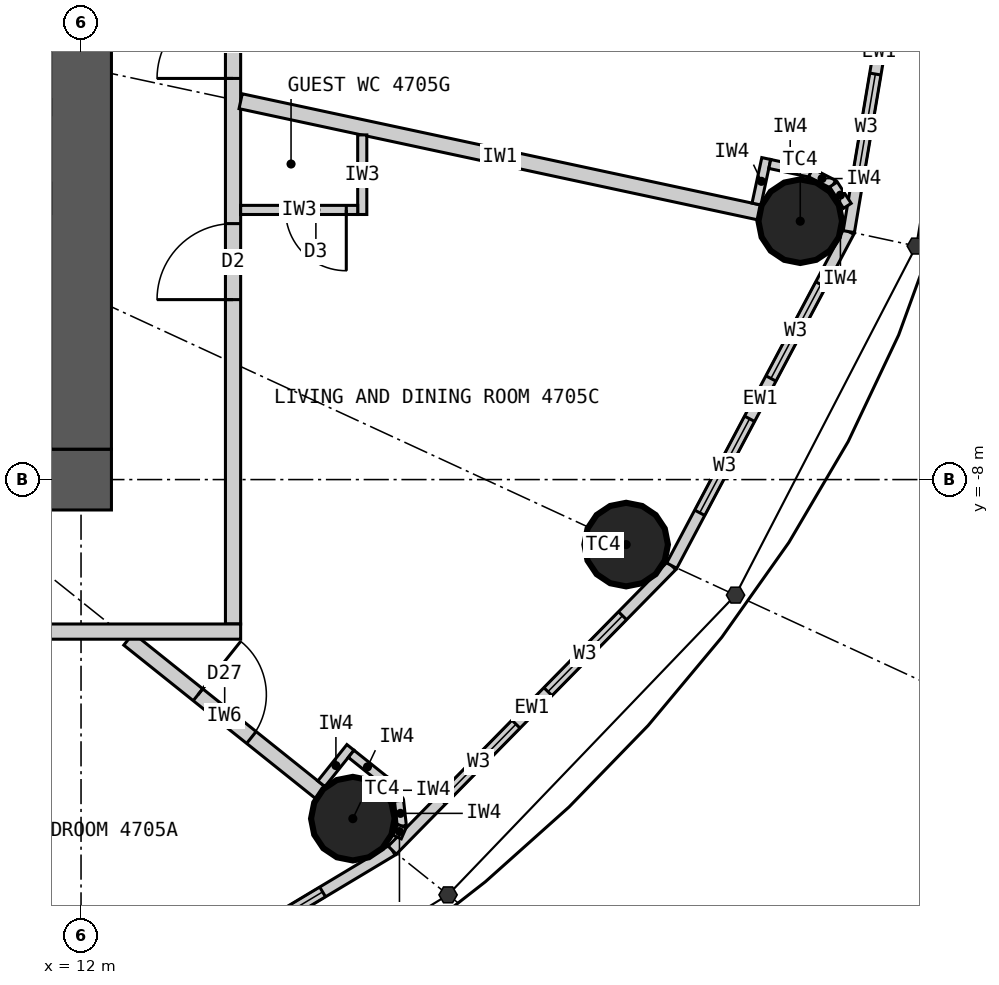
"""IFC4 building model, lengths in metres.
Left out: names, types, materials, properties, quantities, classifications, styles, units other than length and angle.
Written with IfcOpenShell. Run it as: python <this file> out.ifc"""

import sys

from ifc_helpers import new_model, si_unit, direction, frame, frame_2d, origin, origin_2d, place, context, subcontext, project, spatial, rectangle, circle, extrude, element, fill, save


model = new_model("IFC4")
c1 = context("Model", 3, precision=1e-05, world=origin(), true_north=direction((0.0, 1.0)))
c2 = subcontext(c1, "Body", "Model", "MODEL_VIEW")
j1 = project(units=[si_unit("LENGTHUNIT", "METRE"), si_unit("PLANEANGLEUNIT", "RADIAN")], contexts=[c1])
p1 = place(None, origin())
s1 = spatial("IfcSite", under=j1, at=p1, CompositionType="ELEMENT")
p2 = place(p1, origin())
s2 = spatial("IfcBuilding", under=s1, at=p2, CompositionType="ELEMENT")
p3 = place(p2, frame((0.0, 0.0, 176.4)))
s3 = spatial("IfcBuildingStorey", under=s2, at=p3, CompositionType="ELEMENT", Elevation=176.4)
for number, where, z_axis, x_axis in (
    (1, (15.576, -12.461, 0.0), (0.0, 0.0, 1.0), (1.0, 0.0, 0.0)),
    (2, (19.172, -8.855, 0.0), (0.0, 0.0, 1.0), (1.0, 0.0, 0.0)),
    (3, (21.463, -4.601, 0.0), (0.0, 0.0, 1.0), (1.0, 0.0, 0.0)),
):
    element("IfcColumn", number, at=place(p3, frame(where, z_axis=z_axis, x_axis=x_axis)), inside=s3, PredefinedType="COLUMN", context=c2, shape_type="SweptSolid", body=[
        extrude(circle(Radius=0.55, at=origin_2d()), origin(), (0.0, 0.0, 1.0), 3.3),
    ])
p4 = place(p3, frame((12.4, -8.0, 0.0), z_axis=(0.0, 0.0, 1.0), x_axis=(-1.0, 0.0, 0.0)))
e4 = element("IfcWall", 4, at=p4, inside=s3, PredefinedType="SHEAR", context=c2, shape_type="SweptSolid", body=[
    extrude(rectangle(XDim=24.8, YDim=0.8, at=frame_2d((12.4, 0.0))), origin(), (0.0, 0.0, 1.0), 3.3),
])
p5 = place(p4, frame((11.1, 0.0, 0.0)))
e5 = element("IfcOpeningElement", 5, at=p5, cuts=e4, PredefinedType="OPENING", context=c2, shape_type="SweptSolid", body=[
    extrude(rectangle(XDim=1.2, YDim=2.2, at=frame_2d((0.6, 1.1))), frame((0.0, 0.41, 0.0), z_axis=(0.0, -1.0, 0.0), x_axis=(1.0, 0.0, 0.0)), (0.0, 0.0, 1.0), 0.82),
])
p6 = place(p4, frame((18.7, 0.0, 0.0)))
e6 = element("IfcOpeningElement", 6, at=p6, cuts=e4, PredefinedType="OPENING", context=c2, shape_type="SweptSolid", body=[
    extrude(rectangle(XDim=0.9, YDim=2.2, at=frame_2d((0.45, 1.1))), frame((0.0, 0.41, 0.0), z_axis=(0.0, -1.0, 0.0), x_axis=(1.0, 0.0, 0.0)), (0.0, 0.0, 1.0), 0.82),
])
p7 = place(p3, frame((12.0, -7.6, 0.0), z_axis=(0.0, 0.0, 1.0), x_axis=(0.0, 1.0, 0.0)))
e7 = element("IfcWall", 7, at=p7, inside=s3, PredefinedType="SHEAR", context=c2, shape_type="SweptSolid", body=[
    extrude(rectangle(XDim=15.2, YDim=0.8, at=frame_2d((7.6, 0.0))), origin(), (0.0, 0.0, 1.0), 3.3),
])
p8 = place(p7, frame((6.7, 0.0, 0.0)))
e8 = element("IfcOpeningElement", 8, at=p8, cuts=e7, PredefinedType="OPENING", context=c2, shape_type="SweptSolid", body=[
    extrude(rectangle(XDim=1.8, YDim=2.2, at=frame_2d((0.9, 1.1))), frame((0.0, 0.41, 0.0), z_axis=(0.0, -1.0, 0.0), x_axis=(1.0, 0.0, 0.0)), (0.0, 0.0, 1.0), 0.82),
])
p9 = place(p3, frame((11.346, -15.722, 0.0), z_axis=(0.0, 0.0, 1.0), x_axis=(0.857695199231, 0.514158482587, 0.0)))
e9 = element("IfcWall", 9, at=p9, inside=s3, PredefinedType="ELEMENTEDWALL", context=c2, shape_type="SweptSolid", body=[
    extrude(rectangle(XDim=5.536, YDim=0.15, at=frame_2d((2.768, 0.0))), origin(), (0.0, 0.0, 1.0), 3.12),
])
p10 = place(p9, frame((1.068, 0.0, 0.9)))
e10 = element("IfcOpeningElement", 10, at=p10, cuts=e9, PredefinedType="OPENING", context=c2, shape_type="SweptSolid", body=[
    extrude(rectangle(XDim=1.4, YDim=1.9, at=frame_2d((0.7, 0.95))), frame((0.0, 0.085, 0.0), z_axis=(0.0, -1.0, 0.0), x_axis=(1.0, 0.0, 0.0)), (0.0, 0.0, 1.0), 0.17),
])
p11 = place(p9, frame((3.068, 0.0, 0.9)))
e11 = element("IfcOpeningElement", 11, at=p11, cuts=e9, PredefinedType="OPENING", context=c2, shape_type="SweptSolid", body=[
    extrude(rectangle(XDim=1.4, YDim=1.9, at=frame_2d((0.7, 0.95))), frame((0.0, 0.085, 0.0), z_axis=(0.0, -1.0, 0.0), x_axis=(1.0, 0.0, 0.0)), (0.0, 0.0, 1.0), 0.17),
])
p12 = place(p3, frame((16.095, -12.876, 0.0), z_axis=(0.0, 0.0, 1.0), x_axis=(0.700727467776, 0.71342905457, 0.0)))
e12 = element("IfcWall", 12, at=p12, inside=s3, PredefinedType="ELEMENTEDWALL", context=c2, shape_type="SweptSolid", body=[
    extrude(rectangle(XDim=5.247, YDim=0.15, at=frame_2d((2.624, 0.0))), origin(), (0.0, 0.0, 1.0), 3.12),
])
p13 = place(p12, frame((0.924, 0.0, 0.9)))
e13 = element("IfcOpeningElement", 13, at=p13, cuts=e12, PredefinedType="OPENING", context=c2, shape_type="SweptSolid", body=[
    extrude(rectangle(XDim=1.4, YDim=1.9, at=frame_2d((0.7, 0.95))), frame((0.0, 0.085, 0.0), z_axis=(0.0, -1.0, 0.0), x_axis=(1.0, 0.0, 0.0)), (0.0, 0.0, 1.0), 0.17),
])
p14 = place(p12, frame((2.924, 0.0, 0.9)))
e14 = element("IfcOpeningElement", 14, at=p14, cuts=e12, PredefinedType="OPENING", context=c2, shape_type="SweptSolid", body=[
    extrude(rectangle(XDim=1.4, YDim=1.9, at=frame_2d((0.7, 0.95))), frame((0.0, 0.085, 0.0), z_axis=(0.0, -1.0, 0.0), x_axis=(1.0, 0.0, 0.0)), (0.0, 0.0, 1.0), 0.17),
])
p15 = place(p3, frame((19.772, -9.132, 0.0), z_axis=(0.0, 0.0, 1.0), x_axis=(0.468428906714, 0.883501193748, 0.0)))
e15 = element("IfcWall", 15, at=p15, inside=s3, PredefinedType="ELEMENTEDWALL", context=c2, shape_type="SweptSolid", body=[
    extrude(rectangle(XDim=4.974, YDim=0.15, at=frame_2d((2.487, 0.0))), origin(), (0.0, 0.0, 1.0), 3.12),
])
p16 = place(p15, frame((0.787, 0.0, 0.9)))
e16 = element("IfcOpeningElement", 16, at=p16, cuts=e15, PredefinedType="OPENING", context=c2, shape_type="SweptSolid", body=[
    extrude(rectangle(XDim=1.4, YDim=1.9, at=frame_2d((0.7, 0.95))), frame((0.0, 0.085, 0.0), z_axis=(0.0, -1.0, 0.0), x_axis=(1.0, 0.0, 0.0)), (0.0, 0.0, 1.0), 0.17),
])
p17 = place(p15, frame((2.787, 0.0, 0.9)))
e17 = element("IfcOpeningElement", 17, at=p17, cuts=e15, PredefinedType="OPENING", context=c2, shape_type="SweptSolid", body=[
    extrude(rectangle(XDim=1.4, YDim=1.9, at=frame_2d((0.7, 0.95))), frame((0.0, 0.085, 0.0), z_axis=(0.0, -1.0, 0.0), x_axis=(1.0, 0.0, 0.0)), (0.0, 0.0, 1.0), 0.17),
])
p18 = place(p3, frame((22.102, -4.738, 0.0), z_axis=(0.0, 0.0, 1.0), x_axis=(0.166162111254, 0.986098449843, 0.0)))
e18 = element("IfcWall", 18, at=p18, inside=s3, PredefinedType="ELEMENTEDWALL", context=c2, shape_type="SweptSolid", body=[
    extrude(rectangle(XDim=4.805, YDim=0.15, at=frame_2d((2.402, 0.0))), origin(), (0.0, 0.0, 1.0), 3.12),
])
p19 = place(p18, frame((0.702, 0.0, 0.9)))
e19 = element("IfcOpeningElement", 19, at=p19, cuts=e18, PredefinedType="OPENING", context=c2, shape_type="SweptSolid", body=[
    extrude(rectangle(XDim=1.4, YDim=1.9, at=frame_2d((0.7, 0.95))), frame((0.0, 0.085, 0.0), z_axis=(0.0, -1.0, 0.0), x_axis=(1.0, 0.0, 0.0)), (0.0, 0.0, 1.0), 0.17),
])
p20 = place(p18, frame((2.702, 0.0, 0.9)))
e20 = element("IfcOpeningElement", 20, at=p20, cuts=e18, PredefinedType="OPENING", context=c2, shape_type="SweptSolid", body=[
    extrude(rectangle(XDim=1.4, YDim=1.9, at=frame_2d((0.7, 0.95))), frame((0.0, 0.085, 0.0), z_axis=(0.0, -1.0, 0.0), x_axis=(1.0, 0.0, 0.0)), (0.0, 0.0, 1.0), 0.17),
])
p21 = place(p3, frame((14.0, -9.9, 0.0), z_axis=(0.0, 0.0, 1.0), x_axis=(0.0, 1.0, 0.0)))
e21 = element("IfcWall", 21, at=p21, inside=s3, PredefinedType="PARTITIONING", context=c2, shape_type="SweptSolid", body=[
    extrude(rectangle(XDim=19.8, YDim=0.2, at=frame_2d((9.9, 0.0))), origin(), (0.0, 0.0, 1.0), 3.12),
])
p22 = place(p21, frame((4.268, 0.0, 0.0)))
e22 = element("IfcOpeningElement", 22, at=p22, cuts=e21, PredefinedType="OPENING", context=c2, shape_type="SweptSolid", body=[
    extrude(rectangle(XDim=1.0, YDim=2.2, at=frame_2d((0.5, 1.1))), frame((0.0, 0.11, 0.0), z_axis=(0.0, -1.0, 0.0), x_axis=(1.0, 0.0, 0.0)), (0.0, 0.0, 1.0), 0.22),
])
p23 = place(p21, frame((7.177, 0.0, 0.0)))
e23 = element("IfcOpeningElement", 23, at=p23, cuts=e21, PredefinedType="OPENING", context=c2, shape_type="SweptSolid", body=[
    extrude(rectangle(XDim=1.0, YDim=2.2, at=frame_2d((0.5, 1.1))), frame((0.0, 0.11, 0.0), z_axis=(0.0, -1.0, 0.0), x_axis=(1.0, 0.0, 0.0)), (0.0, 0.0, 1.0), 0.22),
])
p24 = place(p21, frame((17.701, 0.0, 0.0)))
e24 = element("IfcOpeningElement", 24, at=p24, cuts=e21, PredefinedType="OPENING", context=c2, shape_type="SweptSolid", body=[
    extrude(rectangle(XDim=1.0, YDim=2.2, at=frame_2d((0.5, 1.1))), frame((0.0, 0.11, 0.0), z_axis=(0.0, -1.0, 0.0), x_axis=(1.0, 0.0, 0.0)), (0.0, 0.0, 1.0), 0.22),
])
p25 = place(p3, frame((12.625, -10.1, 0.0), z_axis=(0.0, 0.0, 1.0), x_axis=(0.780876185034, -0.624685827954, 0.0)))
e25 = element("IfcWall", 25, at=p25, inside=s3, PredefinedType="PARTITIONING", context=c2, shape_type="SweptSolid", body=[
    extrude(rectangle(XDim=3.229, YDim=0.2, at=frame_2d((1.615, 0.0))), origin(), (0.0, 0.0, 1.0), 2.42),
])
p26 = place(p25, frame((1.17, 0.0, 0.0)))
e26 = element("IfcOpeningElement", 26, at=p26, cuts=e25, PredefinedType="OPENING", context=c2, shape_type="SweptSolid", body=[
    extrude(rectangle(XDim=0.9, YDim=2.1, at=frame_2d((0.45, 1.05))), frame((0.0, 0.11, 0.0), z_axis=(0.0, -1.0, 0.0), x_axis=(1.0, 0.0, 0.0)), (0.0, 0.0, 1.0), 0.22),
])
p27 = place(p3, frame((14.1, -3.022, 0.0), z_axis=(0.0, 0.0, 1.0), x_axis=(0.977790639684, -0.209584028367, 0.0)))
e27 = element("IfcWall", 27, at=p27, inside=s3, PredefinedType="PARTITIONING", context=c2, shape_type="SweptSolid", body=[
    extrude(rectangle(XDim=6.98, YDim=0.2, at=frame_2d((3.49, 0.0))), origin(), (0.0, 0.0, 1.0), 2.42),
])
p28 = place(p3, frame((15.7, -3.465, 0.0), z_axis=(0.0, 0.0, 1.0), x_axis=(0.0, -1.0, 0.0)))
e28 = element("IfcWall", 28, at=p28, inside=s3, PredefinedType="PARTITIONING", context=c2, shape_type="SweptSolid", body=[
    extrude(rectangle(XDim=1.047, YDim=0.12, at=frame_2d((0.523, 0.0))), origin(), (0.0, 0.0, 1.0), 3.12),
])
p29 = place(p3, frame((14.1, -4.452, 0.0), z_axis=(0.0, 0.0, 1.0), x_axis=(1.0, 0.0, 0.0)))
e29 = element("IfcWall", 29, at=p29, inside=s3, PredefinedType="PARTITIONING", context=c2, shape_type="SweptSolid", body=[
    extrude(rectangle(XDim=1.54, YDim=0.12, at=frame_2d((0.77, 0.0))), origin(), (0.0, 0.0, 1.0), 3.12),
])
p30 = place(p29, frame((0.59, 0.0, 0.0)))
e30 = element("IfcOpeningElement", 30, at=p30, cuts=e29, PredefinedType="OPENING", context=c2, shape_type="SweptSolid", body=[
    extrude(rectangle(XDim=0.8, YDim=2.1, at=frame_2d((0.4, 1.05))), frame((0.0, 0.07, 0.0), z_axis=(0.0, -1.0, 0.0), x_axis=(1.0, 0.0, 0.0)), (0.0, 0.0, 1.0), 0.14),
])
p31 = place(p3, frame((14.1, -10.0, 0.0), z_axis=(0.0, 0.0, 1.0), x_axis=(-1.0, 0.0, 0.0)))
e31 = element("IfcWall", 31, at=p31, inside=s3, PredefinedType="PARTITIONING", context=c2, shape_type="SweptSolid", body=[
    extrude(rectangle(XDim=10.582, YDim=0.2, at=frame_2d((5.291, 0.0))), origin(), (0.0, 0.0, 1.0), 3.12),
])
p32 = place(p3, frame((15.162, -12.002, 0.0), z_axis=(0.0, 0.0, 1.0), x_axis=(0.624597762427, 0.780946627607, 0.0)))
e32 = element("IfcWall", 32, at=p32, inside=s3, PredefinedType="PARTITIONING", context=c2, shape_type="SweptSolid", body=[
    extrude(rectangle(XDim=0.612, YDim=0.12, at=frame_2d((0.306, 0.0))), origin(), (0.0, 0.0, 1.0), 3.12),
])
p33 = place(p3, frame((15.554, -11.608, 0.0), z_axis=(0.0, 0.0, 1.0), x_axis=(0.780695577787, -0.624911525597, 0.0)))
e33 = element("IfcWall", 33, at=p33, inside=s3, PredefinedType="PARTITIONING", context=c2, shape_type="SweptSolid", body=[
    extrude(rectangle(XDim=0.55, YDim=0.12, at=frame_2d((0.275, 0.0))), origin(), (0.0, 0.0, 1.0), 3.12),
])
p34 = place(p3, frame((15.984, -11.952, 0.0), z_axis=(0.0, 0.0, 1.0), x_axis=(0.592335221171, -0.805691619517, 0.0)))
e34 = element("IfcWall", 34, at=p34, inside=s3, PredefinedType="PARTITIONING", context=c2, shape_type="SweptSolid", body=[
    extrude(rectangle(XDim=0.338, YDim=0.12, at=frame_2d((0.169, 0.0))), origin(), (0.0, 0.0, 1.0), 3.12),
])
p35 = place(p3, frame((16.184, -12.224, 0.0), z_axis=(0.0, 0.0, 1.0), x_axis=(0.110669692975, -0.993857242795, 0.0)))
e35 = element("IfcWall", 35, at=p35, inside=s3, PredefinedType="PARTITIONING", context=c2, shape_type="SweptSolid", body=[
    extrude(rectangle(XDim=0.337, YDim=0.12, at=frame_2d((0.169, 0.0))), origin(), (0.0, 0.0, 1.0), 3.12),
])
p36 = place(p3, frame((16.221, -12.559, 0.0), z_axis=(0.0, 0.0, 1.0), x_axis=(-0.401064416249, -0.916049853457, 0.0)))
e36 = element("IfcWall", 36, at=p36, inside=s3, PredefinedType="PARTITIONING", context=c2, shape_type="SweptSolid", body=[
    extrude(rectangle(XDim=0.156, YDim=0.12, at=frame_2d((0.078, 0.0))), origin(), (0.0, 0.0, 1.0), 3.12),
])
p37 = place(p3, frame((20.887, -4.375, 0.0), z_axis=(0.0, 0.0, 1.0), x_axis=(0.209746941802, 0.977755705892, 0.0)))
e37 = element("IfcWall", 37, at=p37, inside=s3, PredefinedType="PARTITIONING", context=c2, shape_type="SweptSolid", body=[
    extrude(rectangle(XDim=0.612, YDim=0.12, at=frame_2d((0.306, 0.0))), origin(), (0.0, 0.0, 1.0), 3.12),
])
p38 = place(p3, frame((21.062, -3.848, 0.0), z_axis=(0.0, 0.0, 1.0), x_axis=(0.977789415726, -0.209589738521, 0.0)))
e38 = element("IfcWall", 38, at=p38, inside=s3, PredefinedType="PARTITIONING", context=c2, shape_type="SweptSolid", body=[
    extrude(rectangle(XDim=0.55, YDim=0.12, at=frame_2d((0.275, 0.0))), origin(), (0.0, 0.0, 1.0), 3.12),
])
p39 = place(p3, frame((21.599, -3.963, 0.0), z_axis=(0.0, 0.0, 1.0), x_axis=(0.890193602875, -0.455582428766, 0.0)))
e39 = element("IfcWall", 39, at=p39, inside=s3, PredefinedType="PARTITIONING", context=c2, shape_type="SweptSolid", body=[
    extrude(rectangle(XDim=0.338, YDim=0.12, at=frame_2d((0.169, 0.0))), origin(), (0.0, 0.0, 1.0), 3.12),
])
p40 = place(p3, frame((21.9, -4.117, 0.0), z_axis=(0.0, 0.0, 1.0), x_axis=(0.543582688681, -0.839355622228, 0.0)))
e40 = element("IfcWall", 40, at=p40, inside=s3, PredefinedType="PARTITIONING", context=c2, shape_type="SweptSolid", body=[
    extrude(rectangle(XDim=0.336, YDim=0.12, at=frame_2d((0.168, 0.0))), origin(), (0.0, 0.0, 1.0), 3.12),
])
p41 = place(p11, origin())
e41 = element("IfcWindow", 41, at=p41, inside=s3, PartitioningType="SINGLE_PANEL", PredefinedType="WINDOW", context=c2, shape_type="SweptSolid", body=[
    extrude(rectangle(XDim=1.4, YDim=1.9, at=frame_2d((0.7, 0.95))), frame((0.0, 0.03, 0.0), z_axis=(0.0, -1.0, 0.0), x_axis=(1.0, 0.0, 0.0)), (0.0, 0.0, 1.0), 0.06),
])
fill(e11, e41)
p42 = place(p13, origin())
e42 = element("IfcWindow", 42, at=p42, inside=s3, PartitioningType="SINGLE_PANEL", PredefinedType="WINDOW", context=c2, shape_type="SweptSolid", body=[
    extrude(rectangle(XDim=1.4, YDim=1.9, at=frame_2d((0.7, 0.95))), frame((0.0, 0.03, 0.0), z_axis=(0.0, -1.0, 0.0), x_axis=(1.0, 0.0, 0.0)), (0.0, 0.0, 1.0), 0.06),
])
fill(e13, e42)
p43 = place(p14, origin())
e43 = element("IfcWindow", 43, at=p43, inside=s3, PartitioningType="SINGLE_PANEL", PredefinedType="WINDOW", context=c2, shape_type="SweptSolid", body=[
    extrude(rectangle(XDim=1.4, YDim=1.9, at=frame_2d((0.7, 0.95))), frame((0.0, 0.03, 0.0), z_axis=(0.0, -1.0, 0.0), x_axis=(1.0, 0.0, 0.0)), (0.0, 0.0, 1.0), 0.06),
])
fill(e14, e43)
p44 = place(p16, origin())
e44 = element("IfcWindow", 44, at=p44, inside=s3, PartitioningType="SINGLE_PANEL", PredefinedType="WINDOW", context=c2, shape_type="SweptSolid", body=[
    extrude(rectangle(XDim=1.4, YDim=1.9, at=frame_2d((0.7, 0.95))), frame((0.0, 0.03, 0.0), z_axis=(0.0, -1.0, 0.0), x_axis=(1.0, 0.0, 0.0)), (0.0, 0.0, 1.0), 0.06),
])
fill(e16, e44)
p45 = place(p17, origin())
e45 = element("IfcWindow", 45, at=p45, inside=s3, PartitioningType="SINGLE_PANEL", PredefinedType="WINDOW", context=c2, shape_type="SweptSolid", body=[
    extrude(rectangle(XDim=1.4, YDim=1.9, at=frame_2d((0.7, 0.95))), frame((0.0, 0.03, 0.0), z_axis=(0.0, -1.0, 0.0), x_axis=(1.0, 0.0, 0.0)), (0.0, 0.0, 1.0), 0.06),
])
fill(e17, e45)
p46 = place(p19, origin())
e46 = element("IfcWindow", 46, at=p46, inside=s3, PartitioningType="SINGLE_PANEL", PredefinedType="WINDOW", context=c2, shape_type="SweptSolid", body=[
    extrude(rectangle(XDim=1.4, YDim=1.9, at=frame_2d((0.7, 0.95))), frame((0.0, 0.03, 0.0), z_axis=(0.0, -1.0, 0.0), x_axis=(1.0, 0.0, 0.0)), (0.0, 0.0, 1.0), 0.06),
])
fill(e19, e46)
p47 = place(p30, origin())
e47 = element("IfcDoor", 47, at=p47, inside=s3, OperationType="SINGLE_SWING_RIGHT", PredefinedType="DOOR", context=c2, shape_type="SweptSolid", body=[
    extrude(rectangle(XDim=0.8, YDim=2.1, at=frame_2d((0.4, 1.05))), frame((0.0, 0.025, 0.0), z_axis=(0.0, -1.0, 0.0), x_axis=(1.0, 0.0, 0.0)), (0.0, 0.0, 1.0), 0.05),
])
fill(e30, e47)
p48 = place(p22, origin())
e48 = element("IfcDoor", 48, at=p48, inside=s3, OperationType="SINGLE_SWING_LEFT", PredefinedType="DOOR", context=c2, shape_type="SweptSolid", body=[
    extrude(rectangle(XDim=1.0, YDim=2.2, at=frame_2d((0.5, 1.1))), frame((0.0, 0.025, 0.0), z_axis=(0.0, -1.0, 0.0), x_axis=(1.0, 0.0, 0.0)), (0.0, 0.0, 1.0), 0.05),
])
fill(e22, e48)
p49 = place(p26, origin())
e49 = element("IfcDoor", 49, at=p49, inside=s3, OperationType="SINGLE_SWING_LEFT", PredefinedType="DOOR", context=c2, shape_type="SweptSolid", body=[
    extrude(rectangle(XDim=0.9, YDim=2.1, at=frame_2d((0.45, 1.05))), frame((0.0, 0.025, 0.0), z_axis=(0.0, -1.0, 0.0), x_axis=(1.0, 0.0, 0.0)), (0.0, 0.0, 1.0), 0.05),
])
fill(e26, e49)
p50 = place(p23, origin())
e50 = element("IfcDoor", 50, at=p50, inside=s3, OperationType="SINGLE_SWING_LEFT", PredefinedType="DOOR", context=c2, shape_type="SweptSolid", body=[
    extrude(rectangle(XDim=1.0, YDim=2.2, at=frame_2d((0.5, 1.1))), frame((0.0, 0.025, 0.0), z_axis=(0.0, -1.0, 0.0), x_axis=(1.0, 0.0, 0.0)), (0.0, 0.0, 1.0), 0.05),
])
fill(e23, e50)
save(model, sys.argv[1])
